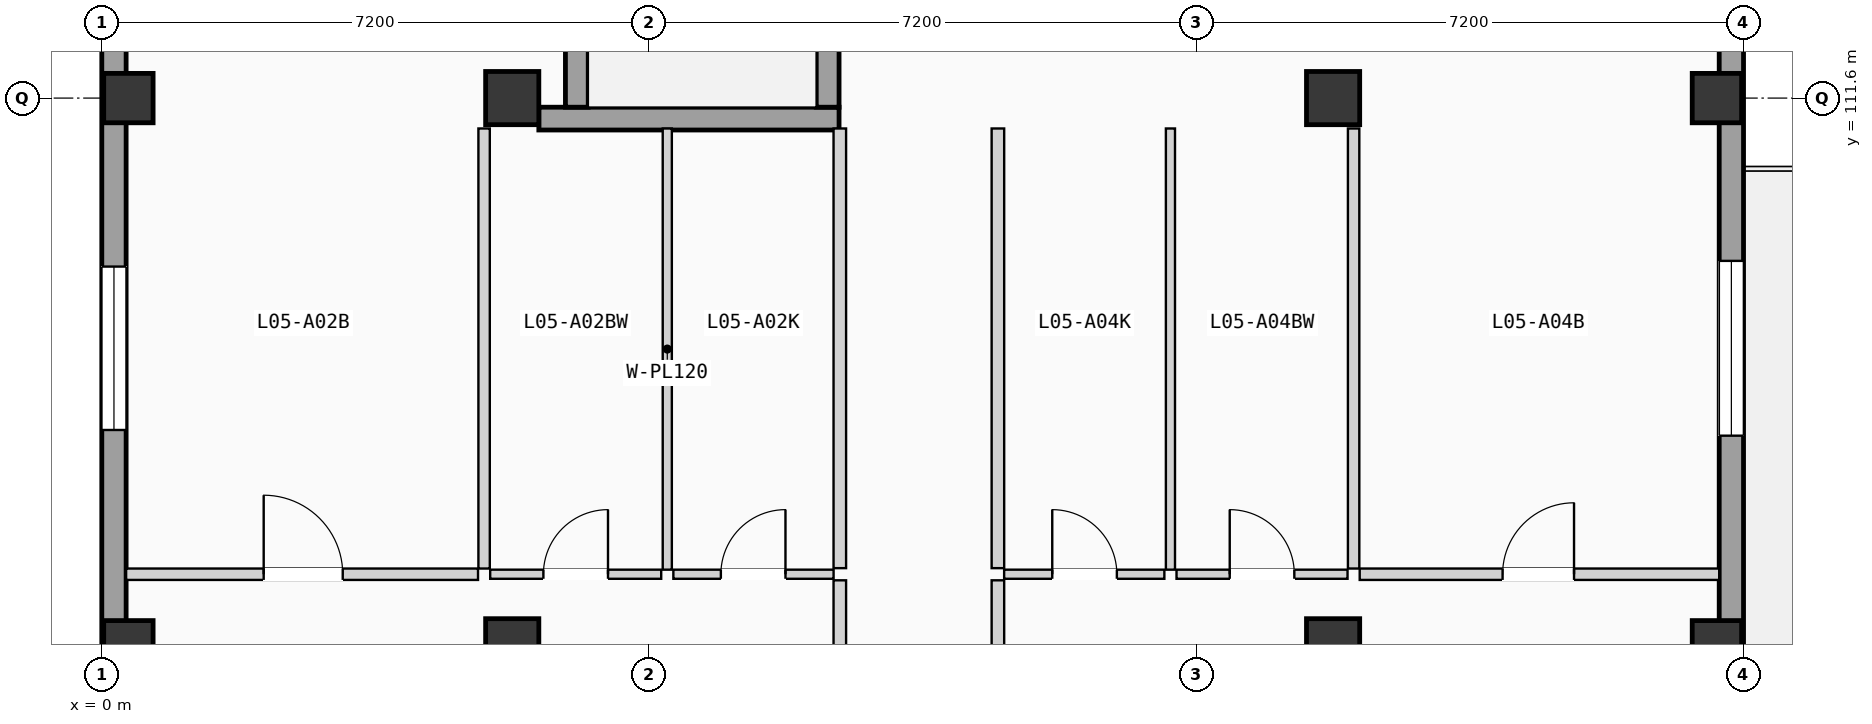
"""IFC4 building model, lengths in metres.
Left out: names, types, materials, properties, quantities, classifications, styles, units other than length and angle.
Written with IfcOpenShell. Run it as: python <this file> out.ifc"""

import sys

from ifc_helpers import new_model, si_unit, direction, frame, frame_2d, origin, origin_2d, place, context, subcontext, project, spatial, rectangle, extrude, element, fill, save


model = new_model("IFC4")
c1 = context("Model", 3, precision=1e-05, world=origin(), true_north=direction((0.0, 1.0)))
c2 = subcontext(c1, "Body", "Model", "MODEL_VIEW")
j1 = project(units=[si_unit("LENGTHUNIT", "METRE"), si_unit("PLANEANGLEUNIT", "RADIAN")], contexts=[c1])
p1 = place(None, origin())
s1 = spatial("IfcSite", under=j1, at=p1, CompositionType="ELEMENT")
p2 = place(p1, origin())
s2 = spatial("IfcBuilding", under=s1, at=p2, CompositionType="ELEMENT")
p3 = place(p2, frame((0.0, 0.0, 18.375)))
s3 = spatial("IfcBuildingStorey", under=s2, at=p3, CompositionType="ELEMENT", Elevation=18.375)
for number, where, z_axis, x_axis in (
    (1, (0.35, 104.4, 0.0), (0.0, 0.0, 1.0), (1.0, 0.0, 0.0)),
    (2, (0.35, 111.6, 0.0), (0.0, 0.0, 1.0), (1.0, 0.0, 0.0)),
):
    element("IfcColumn", number, at=place(p3, frame(where, z_axis=z_axis, x_axis=x_axis)), inside=s3, PredefinedType="COLUMN", context=c2, shape_type="SweptSolid", body=[
        extrude(rectangle(XDim=0.65, YDim=0.65, at=origin_2d()), origin(), (0.0, 0.0, 1.0), 3.15),
    ])
for number, where, z_axis, x_axis in (
    (3, (5.4, 104.4, 0.0), (0.0, 0.0, 1.0), (1.0, 0.0, 0.0)),
    (4, (5.4, 111.6, 0.0), (0.0, 0.0, 1.0), (1.0, 0.0, 0.0)),
    (5, (16.2, 104.4, 0.0), (0.0, 0.0, 1.0), (1.0, 0.0, 0.0)),
    (6, (16.2, 111.6, 0.0), (0.0, 0.0, 1.0), (1.0, 0.0, 0.0)),
):
    element("IfcColumn", number, at=place(p3, frame(where, z_axis=z_axis, x_axis=x_axis)), inside=s3, PredefinedType="COLUMN", context=c2, shape_type="SweptSolid", body=[
        extrude(rectangle(XDim=0.7, YDim=0.7, at=origin_2d()), origin(), (0.0, 0.0, 1.0), 3.15),
    ])
for number, where, z_axis, x_axis in (
    (7, (21.25, 104.4, 0.0), (0.0, 0.0, 1.0), (1.0, 0.0, 0.0)),
    (8, (21.25, 111.6, 0.0), (0.0, 0.0, 1.0), (1.0, 0.0, 0.0)),
):
    element("IfcColumn", number, at=place(p3, frame(where, z_axis=z_axis, x_axis=x_axis)), inside=s3, PredefinedType="COLUMN", context=c2, shape_type="SweptSolid", body=[
        extrude(rectangle(XDim=0.65, YDim=0.65, at=origin_2d()), origin(), (0.0, 0.0, 1.0), 3.15),
    ])
p4 = place(p3, frame((0.16, 68.72, 0.0), z_axis=(0.0, 0.0, 1.0), x_axis=(0.0, 1.0, 0.0)))
e9 = element("IfcWall", 9, at=p4, inside=s3, PredefinedType="SOLIDWALL", context=c2, shape_type="SweptSolid", body=[
    extrude(rectangle(XDim=49.76, YDim=0.32, at=frame_2d((24.88, 0.0))), origin(), (0.0, 0.0, 1.0), 2.89),
])
p5 = place(p4, frame((15.33, 0.0, 0.555)))
e10 = element("IfcOpeningElement", 10, at=p5, cuts=e9, PredefinedType="OPENING", context=c2, shape_type="SweptSolid", body=[
    extrude(rectangle(XDim=2.0, YDim=1.65, at=frame_2d((1.0, 0.825))), frame((0.0, 0.17, 0.0), z_axis=(0.0, -1.0, 0.0), x_axis=(1.0, 0.0, 0.0)), (0.0, 0.0, 1.0), 0.34),
])
p6 = place(p4, frame((9.261, 0.0, 0.85)))
e11 = element("IfcOpeningElement", 11, at=p6, cuts=e9, PredefinedType="OPENING", context=c2, shape_type="SweptSolid", body=[
    extrude(rectangle(XDim=0.95, YDim=1.2, at=frame_2d((0.475, 0.6))), frame((0.0, 0.17, 0.0), z_axis=(0.0, -1.0, 0.0), x_axis=(1.0, 0.0, 0.0)), (0.0, 0.0, 1.0), 0.34),
])
p7 = place(p4, frame((19.265, 0.0, 0.85)))
e12 = element("IfcOpeningElement", 12, at=p7, cuts=e9, PredefinedType="OPENING", context=c2, shape_type="SweptSolid", body=[
    extrude(rectangle(XDim=0.95, YDim=1.2, at=frame_2d((0.475, 0.6))), frame((0.0, 0.17, 0.0), z_axis=(0.0, -1.0, 0.0), x_axis=(1.0, 0.0, 0.0)), (0.0, 0.0, 1.0), 0.34),
])
p8 = place(p4, frame((31.384, 0.0, 0.855)))
e13 = element("IfcOpeningElement", 13, at=p8, cuts=e9, PredefinedType="OPENING", context=c2, shape_type="SweptSolid", body=[
    extrude(rectangle(XDim=2.15, YDim=1.35, at=frame_2d((1.075, 0.675))), frame((0.0, 0.17, 0.0), z_axis=(0.0, -1.0, 0.0), x_axis=(1.0, 0.0, 0.0)), (0.0, 0.0, 1.0), 0.34),
])
p9 = place(p4, frame((24.811, 0.0, 0.705)))
e14 = element("IfcOpeningElement", 14, at=p9, cuts=e9, PredefinedType="OPENING", context=c2, shape_type="SweptSolid", body=[
    extrude(rectangle(XDim=2.15, YDim=1.5, at=frame_2d((1.075, 0.75))), frame((0.0, 0.17, 0.0), z_axis=(0.0, -1.0, 0.0), x_axis=(1.0, 0.0, 0.0)), (0.0, 0.0, 1.0), 0.34),
])
p10 = place(p4, frame((38.513, 0.0, 0.555)))
e15 = element("IfcOpeningElement", 15, at=p10, cuts=e9, PredefinedType="OPENING", context=c2, shape_type="SweptSolid", body=[
    extrude(rectangle(XDim=2.15, YDim=1.65, at=frame_2d((1.075, 0.825))), frame((0.0, 0.17, 0.0), z_axis=(0.0, -1.0, 0.0), x_axis=(1.0, 0.0, 0.0)), (0.0, 0.0, 1.0), 0.34),
])
p11 = place(p3, frame((21.44, 68.72, 0.0), z_axis=(0.0, 0.0, 1.0), x_axis=(0.0, 1.0, 0.0)))
e16 = element("IfcWall", 16, at=p11, inside=s3, PredefinedType="SOLIDWALL", context=c2, shape_type="SweptSolid", body=[
    extrude(rectangle(XDim=49.76, YDim=0.32, at=frame_2d((24.88, 0.0))), origin(), (0.0, 0.0, 1.0), 2.89),
])
p12 = place(p11, frame((10.83, 0.0, 0.0)))
e17 = element("IfcOpeningElement", 17, at=p12, cuts=e16, PredefinedType="OPENING", context=c2, shape_type="SweptSolid", body=[
    extrude(rectangle(XDim=0.95, YDim=2.15, at=frame_2d((0.475, 1.075))), frame((0.0, 0.17, 0.0), z_axis=(0.0, -1.0, 0.0), x_axis=(1.0, 0.0, 0.0)), (0.0, 0.0, 1.0), 0.34),
])
p13 = place(p11, frame((17.741, 0.0, 0.85)))
e18 = element("IfcOpeningElement", 18, at=p13, cuts=e16, PredefinedType="OPENING", context=c2, shape_type="SweptSolid", body=[
    extrude(rectangle(XDim=0.95, YDim=1.2, at=frame_2d((0.475, 0.6))), frame((0.0, 0.17, 0.0), z_axis=(0.0, -1.0, 0.0), x_axis=(1.0, 0.0, 0.0)), (0.0, 0.0, 1.0), 0.34),
])
p14 = place(p11, frame((32.365, 0.0, 0.0)))
e19 = element("IfcOpeningElement", 19, at=p14, cuts=e16, PredefinedType="OPENING", context=c2, shape_type="SweptSolid", body=[
    extrude(rectangle(XDim=1.08, YDim=2.18, at=frame_2d((0.54, 1.09))), frame((0.0, 0.17, 0.0), z_axis=(0.0, -1.0, 0.0), x_axis=(1.0, 0.0, 0.0)), (0.0, 0.0, 1.0), 0.34),
])
p15 = place(p11, frame((24.736, 0.0, 0.9)))
e20 = element("IfcOpeningElement", 20, at=p15, cuts=e16, PredefinedType="OPENING", context=c2, shape_type="SweptSolid", body=[
    extrude(rectangle(XDim=2.3, YDim=1.2, at=frame_2d((1.15, 0.6))), frame((0.0, 0.17, 0.0), z_axis=(0.0, -1.0, 0.0), x_axis=(1.0, 0.0, 0.0)), (0.0, 0.0, 1.0), 0.34),
])
p16 = place(p11, frame((38.438, 0.0, 0.855)))
e21 = element("IfcOpeningElement", 21, at=p16, cuts=e16, PredefinedType="OPENING", context=c2, shape_type="SweptSolid", body=[
    extrude(rectangle(XDim=2.3, YDim=1.35, at=frame_2d((1.15, 0.675))), frame((0.0, 0.17, 0.0), z_axis=(0.0, -1.0, 0.0), x_axis=(1.0, 0.0, 0.0)), (0.0, 0.0, 1.0), 0.34),
])
p17 = place(p3, frame((5.75, 111.33, 0.0), z_axis=(0.0, 0.0, 1.0), x_axis=(1.0, 0.0, 0.0)))
e22 = element("IfcWall", 22, at=p17, inside=s3, PredefinedType="SHEAR", context=c2, shape_type="SweptSolid", body=[
    extrude(rectangle(XDim=3.95, YDim=0.3, at=frame_2d((1.975, 0.0))), origin(), (0.0, 0.0, 1.0), 2.89),
])
p18 = place(p3, frame((6.25, 111.48, 0.0), z_axis=(0.0, 0.0, 1.0), x_axis=(0.0, 1.0, 0.0)))
e23 = element("IfcWall", 23, at=p18, inside=s3, PredefinedType="SHEAR", context=c2, shape_type="SweptSolid", body=[
    extrude(rectangle(XDim=7.0, YDim=0.3, at=frame_2d((3.5, 0.0))), origin(), (0.0, 0.0, 1.0), 2.89),
])
p19 = place(p3, frame((9.55, 111.48, 0.0), z_axis=(0.0, 0.0, 1.0), x_axis=(0.0, 1.0, 0.0)))
e24 = element("IfcWall", 24, at=p19, inside=s3, PredefinedType="SHEAR", context=c2, shape_type="SweptSolid", body=[
    extrude(rectangle(XDim=7.0, YDim=0.3, at=frame_2d((3.5, 0.0))), origin(), (0.0, 0.0, 1.0), 2.89),
])
p20 = place(p19, frame((5.625, 0.0, 0.0)))
e25 = element("IfcOpeningElement", 25, at=p20, cuts=e24, PredefinedType="OPENING", context=c2, shape_type="SweptSolid", body=[
    extrude(rectangle(XDim=1.15, YDim=2.12, at=frame_2d((0.575, 1.06))), frame((0.0, 0.16, 0.0), z_axis=(0.0, -1.0, 0.0), x_axis=(1.0, 0.0, 0.0)), (0.0, 0.0, 1.0), 0.32),
])
p21 = place(p3, frame((9.71, 98.227, 0.0), z_axis=(0.0, 0.0, 1.0), x_axis=(0.0, 1.0, 0.0)))
e26 = element("IfcWall", 26, at=p21, inside=s3, PredefinedType="PARTITIONING", context=c2, shape_type="SweptSolid", body=[
    extrude(rectangle(XDim=7.028, YDim=0.165, at=frame_2d((3.514, 0.0))), origin(), (0.0, 0.0, 1.0), 2.87),
])
p22 = place(p21, frame((3.024, 0.0, 0.0)))
e27 = element("IfcOpeningElement", 27, at=p22, cuts=e26, PredefinedType="OPENING", context=c2, shape_type="SweptSolid", body=[
    extrude(rectangle(XDim=0.98, YDim=2.08, at=frame_2d((0.49, 1.04))), frame((0.0, 0.093, 0.0), z_axis=(0.0, -1.0, 0.0), x_axis=(1.0, 0.0, 0.0)), (0.0, 0.0, 1.0), 0.185),
])
p23 = place(p3, frame((9.71, 105.415, 0.0), z_axis=(0.0, 0.0, 1.0), x_axis=(0.0, 1.0, 0.0)))
e28 = element("IfcWall", 28, at=p23, inside=s3, PredefinedType="PARTITIONING", context=c2, shape_type="SweptSolid", body=[
    extrude(rectangle(XDim=5.785, YDim=0.165, at=frame_2d((2.893, 0.0))), origin(), (0.0, 0.0, 1.0), 2.87),
])
p24 = place(p3, frame((11.79, 98.227, 0.0), z_axis=(0.0, 0.0, 1.0), x_axis=(0.0, 1.0, 0.0)))
e29 = element("IfcWall", 29, at=p24, inside=s3, PredefinedType="PARTITIONING", context=c2, shape_type="SweptSolid", body=[
    extrude(rectangle(XDim=7.028, YDim=0.165, at=frame_2d((3.514, 0.0))), origin(), (0.0, 0.0, 1.0), 2.87),
])
p25 = place(p24, frame((3.024, 0.0, 0.0)))
e30 = element("IfcOpeningElement", 30, at=p25, cuts=e29, PredefinedType="OPENING", context=c2, shape_type="SweptSolid", body=[
    extrude(rectangle(XDim=0.98, YDim=2.08, at=frame_2d((0.49, 1.04))), frame((0.0, 0.093, 0.0), z_axis=(0.0, -1.0, 0.0), x_axis=(1.0, 0.0, 0.0)), (0.0, 0.0, 1.0), 0.185),
])
p26 = place(p3, frame((11.79, 105.415, 0.0), z_axis=(0.0, 0.0, 1.0), x_axis=(0.0, 1.0, 0.0)))
e31 = element("IfcWall", 31, at=p26, inside=s3, PredefinedType="PARTITIONING", context=c2, shape_type="SweptSolid", body=[
    extrude(rectangle(XDim=5.785, YDim=0.165, at=frame_2d((2.893, 0.0))), origin(), (0.0, 0.0, 1.0), 2.87),
])
p27 = place(p3, frame((7.52, 105.335, 0.0), z_axis=(0.0, 0.0, 1.0), x_axis=(1.0, 0.0, 0.0)))
e32 = element("IfcWall", 32, at=p27, inside=s3, PredefinedType="PARTITIONING", context=c2, shape_type="SweptSolid", body=[
    extrude(rectangle(XDim=2.108, YDim=0.12, at=frame_2d((1.054, 0.0))), origin(), (0.0, 0.0, 1.0), 2.87),
])
p28 = place(p27, frame((0.625, 0.0, 0.0)))
e33 = element("IfcOpeningElement", 33, at=p28, cuts=e32, PredefinedType="OPENING", context=c2, shape_type="SweptSolid", body=[
    extrude(rectangle(XDim=0.85, YDim=2.01, at=frame_2d((0.425, 1.005))), frame((0.0, 0.07, 0.0), z_axis=(0.0, -1.0, 0.0), x_axis=(1.0, 0.0, 0.0)), (0.0, 0.0, 1.0), 0.14),
])
p29 = place(p3, frame((0.32, 105.335, 0.0), z_axis=(0.0, 0.0, 1.0), x_axis=(1.0, 0.0, 0.0)))
e34 = element("IfcWall", 34, at=p29, inside=s3, PredefinedType="PARTITIONING", context=c2, shape_type="SweptSolid", body=[
    extrude(rectangle(XDim=4.63, YDim=0.15, at=frame_2d((2.315, 0.0))), origin(), (0.0, 0.0, 1.0), 2.87),
])
p30 = place(p29, frame((1.81, 0.0, 0.0)))
e35 = element("IfcOpeningElement", 35, at=p30, cuts=e34, PredefinedType="OPENING", context=c2, shape_type="SweptSolid", body=[
    extrude(rectangle(XDim=1.04, YDim=2.08, at=frame_2d((0.52, 1.04))), frame((0.0, 0.085, 0.0), z_axis=(0.0, -1.0, 0.0), x_axis=(1.0, 0.0, 0.0)), (0.0, 0.0, 1.0), 0.17),
])
p31 = place(p3, frame((5.11, 105.335, 0.0), z_axis=(0.0, 0.0, 1.0), x_axis=(1.0, 0.0, 0.0)))
e36 = element("IfcWall", 36, at=p31, inside=s3, PredefinedType="PARTITIONING", context=c2, shape_type="SweptSolid", body=[
    extrude(rectangle(XDim=2.25, YDim=0.12, at=frame_2d((1.125, 0.0))), origin(), (0.0, 0.0, 1.0), 2.87),
])
p32 = place(p31, frame((0.7, 0.0, 0.0)))
e37 = element("IfcOpeningElement", 37, at=p32, cuts=e36, PredefinedType="OPENING", context=c2, shape_type="SweptSolid", body=[
    extrude(rectangle(XDim=0.85, YDim=2.01, at=frame_2d((0.425, 1.005))), frame((0.0, 0.07, 0.0), z_axis=(0.0, -1.0, 0.0), x_axis=(1.0, 0.0, 0.0)), (0.0, 0.0, 1.0), 0.14),
])
p33 = place(p3, frame((7.44, 105.395, 0.0), z_axis=(0.0, 0.0, 1.0), x_axis=(0.0, 1.0, 0.0)))
e38 = element("IfcWall", 38, at=p33, inside=s3, PredefinedType="PARTITIONING", context=c2, shape_type="SweptSolid", body=[
    extrude(rectangle(XDim=5.805, YDim=0.12, at=frame_2d((2.902, 0.0))), origin(), (0.0, 0.0, 1.0), 2.87),
])
p34 = place(p3, frame((5.03, 105.41, 0.0), z_axis=(0.0, 0.0, 1.0), x_axis=(0.0, 1.0, 0.0)))
e39 = element("IfcWall", 39, at=p34, inside=s3, PredefinedType="PARTITIONING", context=c2, shape_type="SweptSolid", body=[
    extrude(rectangle(XDim=5.79, YDim=0.15, at=frame_2d((2.895, 0.0))), origin(), (0.0, 0.0, 1.0), 2.87),
])
p35 = place(p3, frame((11.872, 105.335, 0.0), z_axis=(0.0, 0.0, 1.0), x_axis=(1.0, 0.0, 0.0)))
e40 = element("IfcWall", 40, at=p35, inside=s3, PredefinedType="PARTITIONING", context=c2, shape_type="SweptSolid", body=[
    extrude(rectangle(XDim=2.108, YDim=0.12, at=frame_2d((1.054, 0.0))), origin(), (0.0, 0.0, 1.0), 2.87),
])
p36 = place(p35, frame((0.633, 0.0, 0.0)))
e41 = element("IfcOpeningElement", 41, at=p36, cuts=e40, PredefinedType="OPENING", context=c2, shape_type="SweptSolid", body=[
    extrude(rectangle(XDim=0.85, YDim=2.01, at=frame_2d((0.425, 1.005))), frame((0.0, 0.07, 0.0), z_axis=(0.0, -1.0, 0.0), x_axis=(1.0, 0.0, 0.0)), (0.0, 0.0, 1.0), 0.14),
])
p37 = place(p3, frame((16.55, 105.335, 0.0), z_axis=(0.0, 0.0, 1.0), x_axis=(1.0, 0.0, 0.0)))
e42 = element("IfcWall", 42, at=p37, inside=s3, PredefinedType="PARTITIONING", context=c2, shape_type="SweptSolid", body=[
    extrude(rectangle(XDim=4.73, YDim=0.15, at=frame_2d((2.365, 0.0))), origin(), (0.0, 0.0, 1.0), 2.87),
])
p38 = place(p37, frame((1.88, 0.0, 0.0)))
e43 = element("IfcOpeningElement", 43, at=p38, cuts=e42, PredefinedType="OPENING", context=c2, shape_type="SweptSolid", body=[
    extrude(rectangle(XDim=0.94, YDim=2.06, at=frame_2d((0.47, 1.03))), frame((0.0, 0.085, 0.0), z_axis=(0.0, -1.0, 0.0), x_axis=(1.0, 0.0, 0.0)), (0.0, 0.0, 1.0), 0.17),
])
p39 = place(p3, frame((14.14, 105.335, 0.0), z_axis=(0.0, 0.0, 1.0), x_axis=(1.0, 0.0, 0.0)))
e44 = element("IfcWall", 44, at=p39, inside=s3, PredefinedType="PARTITIONING", context=c2, shape_type="SweptSolid", body=[
    extrude(rectangle(XDim=2.25, YDim=0.12, at=frame_2d((1.125, 0.0))), origin(), (0.0, 0.0, 1.0), 2.87),
])
p40 = place(p39, frame((0.7, 0.0, 0.0)))
e45 = element("IfcOpeningElement", 45, at=p40, cuts=e44, PredefinedType="OPENING", context=c2, shape_type="SweptSolid", body=[
    extrude(rectangle(XDim=0.85, YDim=2.01, at=frame_2d((0.425, 1.005))), frame((0.0, 0.07, 0.0), z_axis=(0.0, -1.0, 0.0), x_axis=(1.0, 0.0, 0.0)), (0.0, 0.0, 1.0), 0.14),
])
p41 = place(p3, frame((14.06, 105.395, 0.0), z_axis=(0.0, 0.0, 1.0), x_axis=(0.0, 1.0, 0.0)))
e46 = element("IfcWall", 46, at=p41, inside=s3, PredefinedType="PARTITIONING", context=c2, shape_type="SweptSolid", body=[
    extrude(rectangle(XDim=5.805, YDim=0.12, at=frame_2d((2.902, 0.0))), origin(), (0.0, 0.0, 1.0), 2.87),
])
p42 = place(p3, frame((16.47, 105.41, 0.0), z_axis=(0.0, 0.0, 1.0), x_axis=(0.0, 1.0, 0.0)))
e47 = element("IfcWall", 47, at=p42, inside=s3, PredefinedType="PARTITIONING", context=c2, shape_type="SweptSolid", body=[
    extrude(rectangle(XDim=5.79, YDim=0.15, at=frame_2d((2.895, 0.0))), origin(), (0.0, 0.0, 1.0), 2.87),
])
p43 = place(p10, origin())
e48 = element("IfcWindow", 48, at=p43, inside=s3, PartitioningType="DOUBLE_PANEL_VERTICAL", PredefinedType="WINDOW", context=c2, shape_type="SweptSolid", body=[
    extrude(rectangle(XDim=2.15, YDim=1.65, at=frame_2d((1.075, 0.825))), frame((0.0, 0.03, 0.0), z_axis=(0.0, -1.0, 0.0), x_axis=(1.0, 0.0, 0.0)), (0.0, 0.0, 1.0), 0.06),
])
fill(e15, e48)
p44 = place(p16, origin())
e49 = element("IfcWindow", 49, at=p44, inside=s3, PartitioningType="DOUBLE_PANEL_VERTICAL", PredefinedType="WINDOW", context=c2, shape_type="SweptSolid", body=[
    extrude(rectangle(XDim=2.3, YDim=1.35, at=frame_2d((1.15, 0.675))), frame((0.0, 0.03, 0.0), z_axis=(0.0, -1.0, 0.0), x_axis=(1.0, 0.0, 0.0)), (0.0, 0.0, 1.0), 0.06),
])
fill(e21, e49)
p45 = place(p28, origin())
e50 = element("IfcDoor", 50, at=p45, inside=s3, OperationType="SINGLE_SWING_RIGHT", PredefinedType="DOOR", context=c2, shape_type="SweptSolid", body=[
    extrude(rectangle(XDim=0.85, YDim=2.01, at=frame_2d((0.425, 1.005))), frame((0.0, 0.025, 0.0), z_axis=(0.0, -1.0, 0.0), x_axis=(1.0, 0.0, 0.0)), (0.0, 0.0, 1.0), 0.05),
])
fill(e33, e50)
p46 = place(p30, origin())
e51 = element("IfcDoor", 51, at=p46, inside=s3, OperationType="SINGLE_SWING_LEFT", PredefinedType="DOOR", context=c2, shape_type="SweptSolid", body=[
    extrude(rectangle(XDim=1.04, YDim=2.08, at=frame_2d((0.52, 1.04))), frame((0.0, 0.025, 0.0), z_axis=(0.0, -1.0, 0.0), x_axis=(1.0, 0.0, 0.0)), (0.0, 0.0, 1.0), 0.05),
])
fill(e35, e51)
p47 = place(p32, origin())
e52 = element("IfcDoor", 52, at=p47, inside=s3, OperationType="SINGLE_SWING_RIGHT", PredefinedType="DOOR", context=c2, shape_type="SweptSolid", body=[
    extrude(rectangle(XDim=0.85, YDim=2.01, at=frame_2d((0.425, 1.005))), frame((0.0, 0.025, 0.0), z_axis=(0.0, -1.0, 0.0), x_axis=(1.0, 0.0, 0.0)), (0.0, 0.0, 1.0), 0.05),
])
fill(e37, e52)
p48 = place(p36, origin())
e53 = element("IfcDoor", 53, at=p48, inside=s3, OperationType="SINGLE_SWING_LEFT", PredefinedType="DOOR", context=c2, shape_type="SweptSolid", body=[
    extrude(rectangle(XDim=0.85, YDim=2.01, at=frame_2d((0.425, 1.005))), frame((0.0, 0.025, 0.0), z_axis=(0.0, -1.0, 0.0), x_axis=(1.0, 0.0, 0.0)), (0.0, 0.0, 1.0), 0.05),
])
fill(e41, e53)
p49 = place(p38, origin())
e54 = element("IfcDoor", 54, at=p49, inside=s3, OperationType="SINGLE_SWING_RIGHT", PredefinedType="DOOR", context=c2, shape_type="SweptSolid", body=[
    extrude(rectangle(XDim=0.94, YDim=2.06, at=frame_2d((0.47, 1.03))), frame((0.0, 0.025, 0.0), z_axis=(0.0, -1.0, 0.0), x_axis=(1.0, 0.0, 0.0)), (0.0, 0.0, 1.0), 0.05),
])
fill(e43, e54)
p50 = place(p40, origin())
e55 = element("IfcDoor", 55, at=p50, inside=s3, OperationType="SINGLE_SWING_LEFT", PredefinedType="DOOR", context=c2, shape_type="SweptSolid", body=[
    extrude(rectangle(XDim=0.85, YDim=2.01, at=frame_2d((0.425, 1.005))), frame((0.0, 0.025, 0.0), z_axis=(0.0, -1.0, 0.0), x_axis=(1.0, 0.0, 0.0)), (0.0, 0.0, 1.0), 0.05),
])
fill(e45, e55)
save(model, sys.argv[1])
